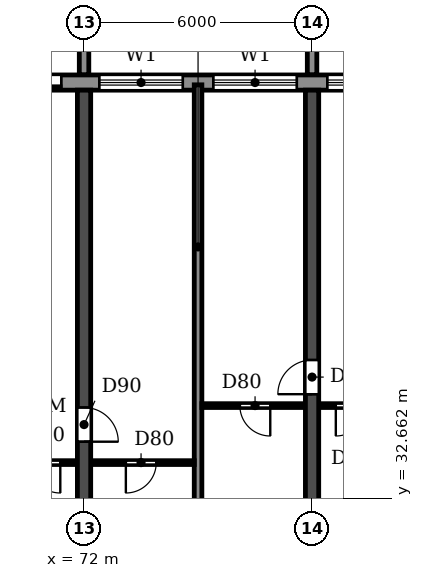
"""IFC4 building model, lengths in metres.
Left out: names, types, materials, properties, quantities, classifications, styles, units other than length and angle.
Written with IfcOpenShell. Run it as: python <this file> out.ifc"""

import sys

from ifc_helpers import new_model, si_unit, direction, frame, frame_2d, origin, place, context, subcontext, project, spatial, polyline, rectangle, outline, extrude, source, transform, mapped, element, fill, save


model = new_model("IFC4")
c1 = context("Model", 3, precision=1e-05, world=origin(), true_north=direction((0.0, 1.0)))
c2 = subcontext(c1, "Body", "Model", "MODEL_VIEW")
j1 = project(units=[si_unit("LENGTHUNIT", "METRE"), si_unit("PLANEANGLEUNIT", "RADIAN")], contexts=[c1])
p1 = place(None, origin())
s1 = spatial("IfcSite", under=j1, at=p1, CompositionType="ELEMENT")
p2 = place(p1, origin())
s2 = spatial("IfcBuilding", under=s1, at=p2, CompositionType="ELEMENT")
p3 = place(p2, frame((0.0, 0.0, 72.9)))
s3 = spatial("IfcBuildingStorey", under=s2, at=p3, CompositionType="ELEMENT", Elevation=72.9)
p4 = place(p3, frame((72.0, 30.525, 0.0), z_axis=(0.0, 0.0, 1.0), x_axis=(0.0, 1.0, 0.0)))
e1 = element("IfcWall", 1, at=p4, inside=s3, PredefinedType="SHEAR", context=c2, shape_type="SweptSolid", body=[
    extrude(rectangle(XDim=12.875, YDim=0.35, at=frame_2d((6.438, 0.0))), origin(), (0.0, 0.0, 1.0), 3.06),
])
p5 = place(p4, frame((3.625, 0.0, 0.0)))
e2 = element("IfcOpeningElement", 2, at=p5, cuts=e1, PredefinedType="OPENING", context=c2, shape_type="SweptSolid", body=[
    extrude(rectangle(XDim=0.9, YDim=2.1, at=frame_2d((0.45, 1.05))), frame((0.0, 0.185, 0.0), z_axis=(0.0, -1.0, 0.0), x_axis=(1.0, 0.0, 0.0)), (0.0, 0.0, 1.0), 0.37),
])
p6 = place(p3, frame((78.0, 30.525, 0.0), z_axis=(0.0, 0.0, 1.0), x_axis=(0.0, 1.0, 0.0)))
e3 = element("IfcWall", 3, at=p6, inside=s3, PredefinedType="SHEAR", context=c2, shape_type="SweptSolid", body=[
    extrude(rectangle(XDim=12.875, YDim=0.35, at=frame_2d((6.438, 0.0))), origin(), (0.0, 0.0, 1.0), 3.06),
])
p7 = place(p6, frame((4.875, 0.0, 0.0)))
e4 = element("IfcOpeningElement", 4, at=p7, cuts=e3, PredefinedType="OPENING", context=c2, shape_type="SweptSolid", body=[
    extrude(rectangle(XDim=0.9, YDim=2.1, at=frame_2d((0.45, 1.05))), frame((0.0, 0.185, 0.0), z_axis=(0.0, -1.0, 0.0), x_axis=(1.0, 0.0, 0.0)), (0.0, 0.0, 1.0), 0.37),
])
p8 = place(p3, frame((91.317, 43.6, 0.0), z_axis=(0.0, 0.0, 1.0), x_axis=(-1.0, 0.0, 0.0)))
e5 = element("IfcWall", 5, at=p8, inside=s3, PredefinedType="STANDARD", context=c2, shape_type="SweptSolid", body=[
    extrude(rectangle(XDim=80.634, YDim=0.4, at=frame_2d((40.317, 0.0))), origin(), (0.0, 0.0, 1.0), 3.06),
])
p9 = place(p8, frame((76.717, 0.0, 0.9)))
e6 = element("IfcOpeningElement", 6, at=p9, cuts=e5, PredefinedType="OPENING", context=c2, shape_type="SweptSolid", body=[
    extrude(rectangle(XDim=2.2, YDim=1.5, at=frame_2d((1.1, 0.75))), frame((0.0, 0.21, 0.0), z_axis=(0.0, -1.0, 0.0), x_axis=(1.0, 0.0, 0.0)), (0.0, 0.0, 1.0), 0.42),
])
p10 = place(p8, frame((73.917, 0.0, 0.0)))
e7 = element("IfcOpeningElement", 7, at=p10, cuts=e5, PredefinedType="OPENING", context=c2, shape_type="SweptSolid", body=[
    extrude(rectangle(XDim=1.8, YDim=2.4, at=frame_2d((0.9, 1.2))), frame((0.0, 0.21, 0.0), z_axis=(0.0, -1.0, 0.0), x_axis=(1.0, 0.0, 0.0)), (0.0, 0.0, 1.0), 0.42),
])
p11 = place(p8, frame((70.917, 0.0, 0.0)))
e8 = element("IfcOpeningElement", 8, at=p11, cuts=e5, PredefinedType="OPENING", context=c2, shape_type="SweptSolid", body=[
    extrude(rectangle(XDim=1.8, YDim=2.4, at=frame_2d((0.9, 1.2))), frame((0.0, 0.21, 0.0), z_axis=(0.0, -1.0, 0.0), x_axis=(1.0, 0.0, 0.0)), (0.0, 0.0, 1.0), 0.42),
])
p12 = place(p8, frame((67.717, 0.0, 0.9)))
e9 = element("IfcOpeningElement", 9, at=p12, cuts=e5, PredefinedType="OPENING", context=c2, shape_type="SweptSolid", body=[
    extrude(rectangle(XDim=2.2, YDim=1.5, at=frame_2d((1.1, 0.75))), frame((0.0, 0.21, 0.0), z_axis=(0.0, -1.0, 0.0), x_axis=(1.0, 0.0, 0.0)), (0.0, 0.0, 1.0), 0.42),
])
p13 = place(p8, frame((64.717, 0.0, 0.9)))
e10 = element("IfcOpeningElement", 10, at=p13, cuts=e5, PredefinedType="OPENING", context=c2, shape_type="SweptSolid", body=[
    extrude(rectangle(XDim=2.2, YDim=1.5, at=frame_2d((1.1, 0.75))), frame((0.0, 0.21, 0.0), z_axis=(0.0, -1.0, 0.0), x_axis=(1.0, 0.0, 0.0)), (0.0, 0.0, 1.0), 0.42),
])
p14 = place(p8, frame((61.917, 0.0, 0.0)))
e11 = element("IfcOpeningElement", 11, at=p14, cuts=e5, PredefinedType="OPENING", context=c2, shape_type="SweptSolid", body=[
    extrude(rectangle(XDim=1.8, YDim=2.4, at=frame_2d((0.9, 1.2))), frame((0.0, 0.21, 0.0), z_axis=(0.0, -1.0, 0.0), x_axis=(1.0, 0.0, 0.0)), (0.0, 0.0, 1.0), 0.42),
])
p15 = place(p8, frame((58.717, 0.0, 0.9)))
e12 = element("IfcOpeningElement", 12, at=p15, cuts=e5, PredefinedType="OPENING", context=c2, shape_type="SweptSolid", body=[
    extrude(rectangle(XDim=2.2, YDim=1.5, at=frame_2d((1.1, 0.75))), frame((0.0, 0.21, 0.0), z_axis=(0.0, -1.0, 0.0), x_axis=(1.0, 0.0, 0.0)), (0.0, 0.0, 1.0), 0.42),
])
p16 = place(p8, frame((55.917, 0.0, 0.0)))
e13 = element("IfcOpeningElement", 13, at=p16, cuts=e5, PredefinedType="OPENING", context=c2, shape_type="SweptSolid", body=[
    extrude(rectangle(XDim=1.8, YDim=2.4, at=frame_2d((0.9, 1.2))), frame((0.0, 0.21, 0.0), z_axis=(0.0, -1.0, 0.0), x_axis=(1.0, 0.0, 0.0)), (0.0, 0.0, 1.0), 0.42),
])
p17 = place(p8, frame((52.717, 0.0, 0.9)))
e14 = element("IfcOpeningElement", 14, at=p17, cuts=e5, PredefinedType="OPENING", context=c2, shape_type="SweptSolid", body=[
    extrude(rectangle(XDim=2.2, YDim=1.5, at=frame_2d((1.1, 0.75))), frame((0.0, 0.21, 0.0), z_axis=(0.0, -1.0, 0.0), x_axis=(1.0, 0.0, 0.0)), (0.0, 0.0, 1.0), 0.42),
])
p18 = place(p8, frame((49.717, 0.0, 0.9)))
e15 = element("IfcOpeningElement", 15, at=p18, cuts=e5, PredefinedType="OPENING", context=c2, shape_type="SweptSolid", body=[
    extrude(rectangle(XDim=2.2, YDim=1.5, at=frame_2d((1.1, 0.75))), frame((0.0, 0.21, 0.0), z_axis=(0.0, -1.0, 0.0), x_axis=(1.0, 0.0, 0.0)), (0.0, 0.0, 1.0), 0.42),
])
p19 = place(p8, frame((46.917, 0.0, 0.0)))
e16 = element("IfcOpeningElement", 16, at=p19, cuts=e5, PredefinedType="OPENING", context=c2, shape_type="SweptSolid", body=[
    extrude(rectangle(XDim=1.8, YDim=2.4, at=frame_2d((0.9, 1.2))), frame((0.0, 0.21, 0.0), z_axis=(0.0, -1.0, 0.0), x_axis=(1.0, 0.0, 0.0)), (0.0, 0.0, 1.0), 0.42),
])
p20 = place(p8, frame((43.717, 0.0, 0.9)))
e17 = element("IfcOpeningElement", 17, at=p20, cuts=e5, PredefinedType="OPENING", context=c2, shape_type="SweptSolid", body=[
    extrude(rectangle(XDim=2.2, YDim=1.5, at=frame_2d((1.1, 0.75))), frame((0.0, 0.21, 0.0), z_axis=(0.0, -1.0, 0.0), x_axis=(1.0, 0.0, 0.0)), (0.0, 0.0, 1.0), 0.42),
])
p21 = place(p8, frame((40.717, 0.0, 0.9)))
e18 = element("IfcOpeningElement", 18, at=p21, cuts=e5, PredefinedType="OPENING", context=c2, shape_type="SweptSolid", body=[
    extrude(rectangle(XDim=2.2, YDim=1.5, at=frame_2d((1.1, 0.75))), frame((0.0, 0.21, 0.0), z_axis=(0.0, -1.0, 0.0), x_axis=(1.0, 0.0, 0.0)), (0.0, 0.0, 1.0), 0.42),
])
p22 = place(p8, frame((37.917, 0.0, 0.0)))
e19 = element("IfcOpeningElement", 19, at=p22, cuts=e5, PredefinedType="OPENING", context=c2, shape_type="SweptSolid", body=[
    extrude(rectangle(XDim=1.8, YDim=2.4, at=frame_2d((0.9, 1.2))), frame((0.0, 0.21, 0.0), z_axis=(0.0, -1.0, 0.0), x_axis=(1.0, 0.0, 0.0)), (0.0, 0.0, 1.0), 0.42),
])
p23 = place(p8, frame((34.717, 0.0, 0.9)))
e20 = element("IfcOpeningElement", 20, at=p23, cuts=e5, PredefinedType="OPENING", context=c2, shape_type="SweptSolid", body=[
    extrude(rectangle(XDim=2.2, YDim=1.5, at=frame_2d((1.1, 0.75))), frame((0.0, 0.21, 0.0), z_axis=(0.0, -1.0, 0.0), x_axis=(1.0, 0.0, 0.0)), (0.0, 0.0, 1.0), 0.42),
])
p24 = place(p8, frame((31.917, 0.0, 0.0)))
e21 = element("IfcOpeningElement", 21, at=p24, cuts=e5, PredefinedType="OPENING", context=c2, shape_type="SweptSolid", body=[
    extrude(rectangle(XDim=1.8, YDim=2.4, at=frame_2d((0.9, 1.2))), frame((0.0, 0.21, 0.0), z_axis=(0.0, -1.0, 0.0), x_axis=(1.0, 0.0, 0.0)), (0.0, 0.0, 1.0), 0.42),
])
p25 = place(p8, frame((28.717, 0.0, 0.9)))
e22 = element("IfcOpeningElement", 22, at=p25, cuts=e5, PredefinedType="OPENING", context=c2, shape_type="SweptSolid", body=[
    extrude(rectangle(XDim=2.2, YDim=1.5, at=frame_2d((1.1, 0.75))), frame((0.0, 0.21, 0.0), z_axis=(0.0, -1.0, 0.0), x_axis=(1.0, 0.0, 0.0)), (0.0, 0.0, 1.0), 0.42),
])
p26 = place(p8, frame((25.717, 0.0, 0.9)))
e23 = element("IfcOpeningElement", 23, at=p26, cuts=e5, PredefinedType="OPENING", context=c2, shape_type="SweptSolid", body=[
    extrude(rectangle(XDim=2.2, YDim=1.5, at=frame_2d((1.1, 0.75))), frame((0.0, 0.21, 0.0), z_axis=(0.0, -1.0, 0.0), x_axis=(1.0, 0.0, 0.0)), (0.0, 0.0, 1.0), 0.42),
])
p27 = place(p8, frame((22.717, 0.0, 0.9)))
e24 = element("IfcOpeningElement", 24, at=p27, cuts=e5, PredefinedType="OPENING", context=c2, shape_type="SweptSolid", body=[
    extrude(rectangle(XDim=2.2, YDim=1.5, at=frame_2d((1.1, 0.75))), frame((0.0, 0.21, 0.0), z_axis=(0.0, -1.0, 0.0), x_axis=(1.0, 0.0, 0.0)), (0.0, 0.0, 1.0), 0.42),
])
p28 = place(p8, frame((19.917, 0.0, 0.0)))
e25 = element("IfcOpeningElement", 25, at=p28, cuts=e5, PredefinedType="OPENING", context=c2, shape_type="SweptSolid", body=[
    extrude(rectangle(XDim=1.8, YDim=2.4, at=frame_2d((0.9, 1.2))), frame((0.0, 0.21, 0.0), z_axis=(0.0, -1.0, 0.0), x_axis=(1.0, 0.0, 0.0)), (0.0, 0.0, 1.0), 0.42),
])
p29 = place(p8, frame((16.717, 0.0, 0.9)))
e26 = element("IfcOpeningElement", 26, at=p29, cuts=e5, PredefinedType="OPENING", context=c2, shape_type="SweptSolid", body=[
    extrude(rectangle(XDim=2.2, YDim=1.5, at=frame_2d((1.1, 0.75))), frame((0.0, 0.21, 0.0), z_axis=(0.0, -1.0, 0.0), x_axis=(1.0, 0.0, 0.0)), (0.0, 0.0, 1.0), 0.42),
])
p30 = place(p8, frame((13.717, 0.0, 0.9)))
e27 = element("IfcOpeningElement", 27, at=p30, cuts=e5, PredefinedType="OPENING", context=c2, shape_type="SweptSolid", body=[
    extrude(rectangle(XDim=2.2, YDim=1.5, at=frame_2d((1.1, 0.75))), frame((0.0, 0.21, 0.0), z_axis=(0.0, -1.0, 0.0), x_axis=(1.0, 0.0, 0.0)), (0.0, 0.0, 1.0), 0.42),
])
p31 = place(p8, frame((10.717, 0.0, 0.9)))
e28 = element("IfcOpeningElement", 28, at=p31, cuts=e5, PredefinedType="OPENING", context=c2, shape_type="SweptSolid", body=[
    extrude(rectangle(XDim=2.2, YDim=1.5, at=frame_2d((1.1, 0.75))), frame((0.0, 0.21, 0.0), z_axis=(0.0, -1.0, 0.0), x_axis=(1.0, 0.0, 0.0)), (0.0, 0.0, 1.0), 0.42),
])
p32 = place(p8, frame((7.917, 0.0, 0.0)))
e29 = element("IfcOpeningElement", 29, at=p32, cuts=e5, PredefinedType="OPENING", context=c2, shape_type="SweptSolid", body=[
    extrude(rectangle(XDim=1.8, YDim=2.4, at=frame_2d((0.9, 1.2))), frame((0.0, 0.21, 0.0), z_axis=(0.0, -1.0, 0.0), x_axis=(1.0, 0.0, 0.0)), (0.0, 0.0, 1.0), 0.42),
])
p33 = place(p8, frame((4.717, 0.0, 0.9)))
e30 = element("IfcOpeningElement", 30, at=p33, cuts=e5, PredefinedType="OPENING", context=c2, shape_type="SweptSolid", body=[
    extrude(rectangle(XDim=2.2, YDim=1.5, at=frame_2d((1.1, 0.75))), frame((0.0, 0.21, 0.0), z_axis=(0.0, -1.0, 0.0), x_axis=(1.0, 0.0, 0.0)), (0.0, 0.0, 1.0), 0.42),
])
p34 = place(p8, frame((1.917, 0.0, 0.0)))
e31 = element("IfcOpeningElement", 31, at=p34, cuts=e5, PredefinedType="OPENING", context=c2, shape_type="SweptSolid", body=[
    extrude(rectangle(XDim=1.8, YDim=2.4, at=frame_2d((0.9, 1.2))), frame((0.0, 0.21, 0.0), z_axis=(0.0, -1.0, 0.0), x_axis=(1.0, 0.0, 0.0)), (0.0, 0.0, 1.0), 0.42),
])
m1 = source(origin(), c2, "Body", "SweptSolid", [
    extrude(outline(polyline([(0.0, 0.0), (0.25, 0.0), (0.25, 3.1), (0.0, 3.1), (0.0, 0.0)])), origin(), (0.0, 0.0, 1.0), 3.1),
])
for number, where in (
    (32, (71.875, 43.8, 0.0)),
    (33, (77.875, 43.8, 0.0)),
):
    element("IfcWall", number, at=place(p3, frame(where)), inside=s3, PredefinedType="STANDARD", context=c2, shape_type="MappedRepresentation", body=[
        mapped(m1, transform((0.0, 0.0, 0.0))),
    ])
p35 = place(p3, frame((75.0, 30.535, 0.0), z_axis=(0.0, 0.0, 1.0), x_axis=(0.0, 1.0, 0.0)))
e34 = element("IfcWall", 34, at=p35, inside=s3, PredefinedType="PARTITIONING", context=c2, shape_type="SweptSolid", body=[
    extrude(rectangle(XDim=13.005, YDim=0.2, at=frame_2d((6.502, 0.0))), origin(), (0.0, 0.0, 1.0), 3.06),
])
p36 = place(p3, frame((69.9, 33.6, 0.0), z_axis=(0.0, 0.0, 1.0), x_axis=(1.0, 0.0, 0.0)))
e35 = element("IfcWall", 35, at=p36, inside=s3, PredefinedType="PARTITIONING", context=c2, shape_type="SweptSolid", body=[
    extrude(rectangle(XDim=1.915, YDim=0.1, at=frame_2d((0.958, 0.0))), origin(), (0.0, 0.0, 1.0), 3.06),
])
p37 = place(p36, frame((0.675, 0.0, 0.0)))
e36 = element("IfcOpeningElement", 36, at=p37, cuts=e35, PredefinedType="OPENING", context=c2, shape_type="SweptSolid", body=[
    extrude(rectangle(XDim=0.8, YDim=2.1, at=frame_2d((0.4, 1.05))), frame((0.0, 0.06, 0.0), z_axis=(0.0, -1.0, 0.0), x_axis=(1.0, 0.0, 0.0)), (0.0, 0.0, 1.0), 0.12),
])
p38 = place(p3, frame((72.185, 33.6, 0.0), z_axis=(0.0, 0.0, 1.0), x_axis=(1.0, 0.0, 0.0)))
e37 = element("IfcWall", 37, at=p38, inside=s3, PredefinedType="PARTITIONING", context=c2, shape_type="SweptSolid", body=[
    extrude(rectangle(XDim=2.715, YDim=0.1, at=frame_2d((1.357, 0.0))), origin(), (0.0, 0.0, 1.0), 3.06),
])
p39 = place(p38, frame((0.915, 0.0, 0.0)))
e38 = element("IfcOpeningElement", 38, at=p39, cuts=e37, PredefinedType="OPENING", context=c2, shape_type="SweptSolid", body=[
    extrude(rectangle(XDim=0.8, YDim=2.1, at=frame_2d((0.4, 1.05))), frame((0.0, 0.06, 0.0), z_axis=(0.0, -1.0, 0.0), x_axis=(1.0, 0.0, 0.0)), (0.0, 0.0, 1.0), 0.12),
])
p40 = place(p3, frame((75.1, 35.1, 0.0), z_axis=(0.0, 0.0, 1.0), x_axis=(1.0, 0.0, 0.0)))
e39 = element("IfcWall", 39, at=p40, inside=s3, PredefinedType="PARTITIONING", context=c2, shape_type="SweptSolid", body=[
    extrude(rectangle(XDim=2.715, YDim=0.1, at=frame_2d((1.357, 0.0))), origin(), (0.0, 0.0, 1.0), 3.06),
])
p41 = place(p40, frame((1.0, 0.0, 0.0)))
e40 = element("IfcOpeningElement", 40, at=p41, cuts=e39, PredefinedType="OPENING", context=c2, shape_type="SweptSolid", body=[
    extrude(rectangle(XDim=0.8, YDim=2.1, at=frame_2d((0.4, 1.05))), frame((0.0, 0.06, 0.0), z_axis=(0.0, -1.0, 0.0), x_axis=(1.0, 0.0, 0.0)), (0.0, 0.0, 1.0), 0.12),
])
p42 = place(p3, frame((78.185, 35.1, 0.0), z_axis=(0.0, 0.0, 1.0), x_axis=(1.0, 0.0, 0.0)))
e41 = element("IfcWall", 41, at=p42, inside=s3, PredefinedType="PARTITIONING", context=c2, shape_type="SweptSolid", body=[
    extrude(rectangle(XDim=1.915, YDim=0.1, at=frame_2d((0.958, 0.0))), origin(), (0.0, 0.0, 1.0), 3.06),
])
p43 = place(p42, frame((0.44, 0.0, 0.0)))
e42 = element("IfcOpeningElement", 42, at=p43, cuts=e41, PredefinedType="OPENING", context=c2, shape_type="SweptSolid", body=[
    extrude(rectangle(XDim=0.8, YDim=2.1, at=frame_2d((0.4, 1.05))), frame((0.0, 0.06, 0.0), z_axis=(0.0, -1.0, 0.0), x_axis=(1.0, 0.0, 0.0)), (0.0, 0.0, 1.0), 0.12),
])
p44 = place(p28, origin())
e43 = element("IfcDoor", 43, at=p44, inside=s3, OperationType="DOUBLE_DOOR_SLIDING", PredefinedType="DOOR", context=c2, shape_type="SweptSolid", body=[
    extrude(rectangle(XDim=1.8, YDim=2.4, at=frame_2d((0.9, 1.2))), frame((0.0, 0.025, 0.0), z_axis=(0.0, -1.0, 0.0), x_axis=(1.0, 0.0, 0.0)), (0.0, 0.0, 1.0), 0.05),
])
fill(e25, e43)
p45 = place(p29, origin())
e44 = element("IfcWindow", 44, at=p45, inside=s3, PartitioningType="DOUBLE_PANEL_HORIZONTAL", PredefinedType="WINDOW", context=c2, shape_type="SweptSolid", body=[
    extrude(rectangle(XDim=2.2, YDim=1.5, at=frame_2d((1.1, 0.75))), frame((0.0, 0.03, 0.0), z_axis=(0.0, -1.0, 0.0), x_axis=(1.0, 0.0, 0.0)), (0.0, 0.0, 1.0), 0.06),
])
fill(e26, e44)
p46 = place(p30, origin())
e45 = element("IfcWindow", 45, at=p46, inside=s3, PartitioningType="DOUBLE_PANEL_HORIZONTAL", PredefinedType="WINDOW", context=c2, shape_type="SweptSolid", body=[
    extrude(rectangle(XDim=2.2, YDim=1.5, at=frame_2d((1.1, 0.75))), frame((0.0, 0.03, 0.0), z_axis=(0.0, -1.0, 0.0), x_axis=(1.0, 0.0, 0.0)), (0.0, 0.0, 1.0), 0.06),
])
fill(e27, e45)
p47 = place(p31, origin())
e46 = element("IfcWindow", 46, at=p47, inside=s3, PartitioningType="DOUBLE_PANEL_HORIZONTAL", PredefinedType="WINDOW", context=c2, shape_type="SweptSolid", body=[
    extrude(rectangle(XDim=2.2, YDim=1.5, at=frame_2d((1.1, 0.75))), frame((0.0, 0.03, 0.0), z_axis=(0.0, -1.0, 0.0), x_axis=(1.0, 0.0, 0.0)), (0.0, 0.0, 1.0), 0.06),
])
fill(e28, e46)
p48 = place(p39, frame((0.8, 0.0, 0.0), z_axis=(0.0, 0.0, 1.0), x_axis=(-1.0, 0.0, 0.0)))
e47 = element("IfcDoor", 47, at=p48, inside=s3, OperationType="SINGLE_SWING_RIGHT", PredefinedType="DOOR", context=c2, shape_type="SweptSolid", body=[
    extrude(rectangle(XDim=0.8, YDim=2.1, at=frame_2d((0.4, 1.05))), frame((0.0, 0.025, 0.0), z_axis=(0.0, -1.0, 0.0), x_axis=(1.0, 0.0, 0.0)), (0.0, 0.0, 1.0), 0.05),
])
fill(e38, e47)
p49 = place(p37, frame((0.8, 0.0, 0.0), z_axis=(0.0, 0.0, 1.0), x_axis=(-1.0, 0.0, 0.0)))
e48 = element("IfcDoor", 48, at=p49, inside=s3, OperationType="SINGLE_SWING_LEFT", PredefinedType="DOOR", context=c2, shape_type="SweptSolid", body=[
    extrude(rectangle(XDim=0.8, YDim=2.1, at=frame_2d((0.4, 1.05))), frame((0.0, 0.025, 0.0), z_axis=(0.0, -1.0, 0.0), x_axis=(1.0, 0.0, 0.0)), (0.0, 0.0, 1.0), 0.05),
])
fill(e36, e48)
p50 = place(p5, frame((0.9, 0.0, 0.0), z_axis=(0.0, 0.0, 1.0), x_axis=(-1.0, 0.0, 0.0)))
e49 = element("IfcDoor", 49, at=p50, inside=s3, OperationType="SINGLE_SWING_RIGHT", PredefinedType="DOOR", context=c2, shape_type="SweptSolid", body=[
    extrude(rectangle(XDim=0.9, YDim=2.1, at=frame_2d((0.45, 1.05))), frame((0.0, 0.025, 0.0), z_axis=(0.0, -1.0, 0.0), x_axis=(1.0, 0.0, 0.0)), (0.0, 0.0, 1.0), 0.05),
])
fill(e2, e49)
p51 = place(p41, frame((0.8, 0.0, 0.0), z_axis=(0.0, 0.0, 1.0), x_axis=(-1.0, 0.0, 0.0)))
e50 = element("IfcDoor", 50, at=p51, inside=s3, OperationType="SINGLE_SWING_LEFT", PredefinedType="DOOR", context=c2, shape_type="SweptSolid", body=[
    extrude(rectangle(XDim=0.8, YDim=2.1, at=frame_2d((0.4, 1.05))), frame((0.0, 0.025, 0.0), z_axis=(0.0, -1.0, 0.0), x_axis=(1.0, 0.0, 0.0)), (0.0, 0.0, 1.0), 0.05),
])
fill(e40, e50)
p52 = place(p7, origin())
e51 = element("IfcDoor", 51, at=p52, inside=s3, OperationType="SINGLE_SWING_LEFT", PredefinedType="DOOR", context=c2, shape_type="SweptSolid", body=[
    extrude(rectangle(XDim=0.9, YDim=2.1, at=frame_2d((0.45, 1.05))), frame((0.0, 0.025, 0.0), z_axis=(0.0, -1.0, 0.0), x_axis=(1.0, 0.0, 0.0)), (0.0, 0.0, 1.0), 0.05),
])
fill(e4, e51)
p53 = place(p43, frame((0.8, 0.0, 0.0), z_axis=(0.0, 0.0, 1.0), x_axis=(-1.0, 0.0, 0.0)))
e52 = element("IfcDoor", 52, at=p53, inside=s3, OperationType="SINGLE_SWING_RIGHT", PredefinedType="DOOR", context=c2, shape_type="SweptSolid", body=[
    extrude(rectangle(XDim=0.8, YDim=2.1, at=frame_2d((0.4, 1.05))), frame((0.0, 0.025, 0.0), z_axis=(0.0, -1.0, 0.0), x_axis=(1.0, 0.0, 0.0)), (0.0, 0.0, 1.0), 0.05),
])
fill(e42, e52)
save(model, sys.argv[1])
